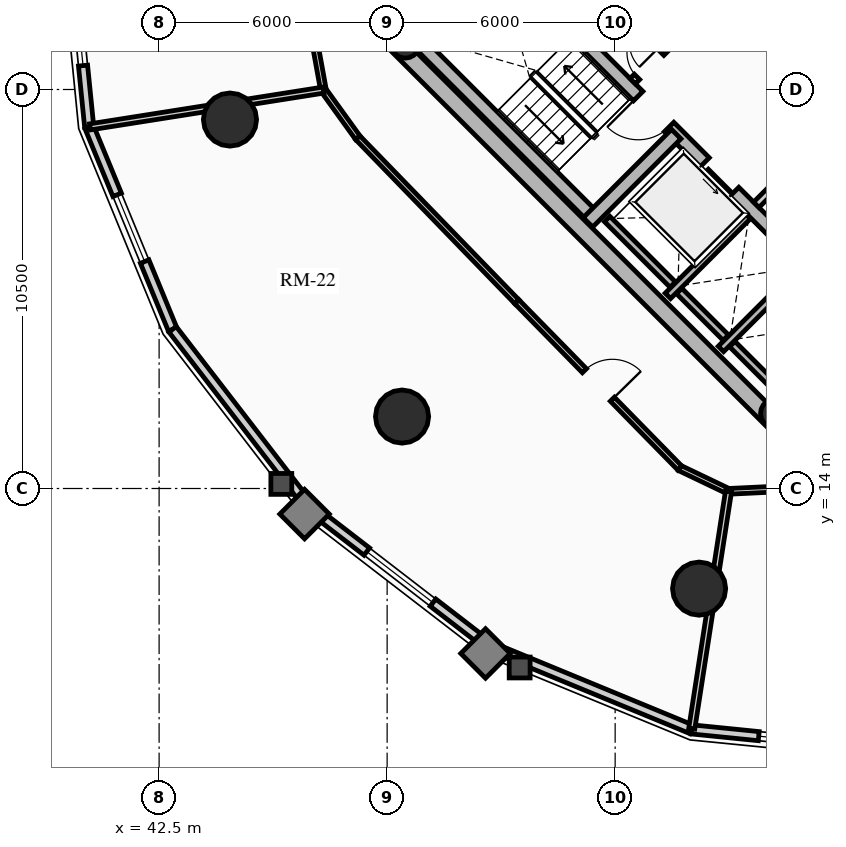
"""IFC4 building model, lengths in metres.
Left out: names, types, materials, properties, quantities, classifications, styles, units other than length and angle.
Written with IfcOpenShell. Run it as: python <this file> out.ifc"""

import sys

from ifc_helpers import new_model, si_unit, direction, frame, frame_2d, origin, origin_2d, place, context, subcontext, project, spatial, rectangle, circle, hollow_circle, extrude, source, transform, mapped, element, fill, save


model = new_model("IFC4")
c1 = context("Model", 3, precision=1e-05, world=origin(), true_north=direction((0.0, 1.0)))
c2 = subcontext(c1, "Body", "Model", "MODEL_VIEW")
j1 = project(units=[si_unit("LENGTHUNIT", "METRE"), si_unit("PLANEANGLEUNIT", "RADIAN")], contexts=[c1])
p1 = place(None, origin())
s1 = spatial("IfcSite", under=j1, at=p1, CompositionType="ELEMENT")
p2 = place(p1, origin())
s2 = spatial("IfcBuilding", under=s1, at=p2, CompositionType="ELEMENT")
p3 = place(p2, frame((0.0, 0.0, 75.97)))
s3 = spatial("IfcBuildingStorey", under=s2, at=p3, CompositionType="ELEMENT", Elevation=75.97)
for number, where, z_axis, x_axis in (
    (1, (58.737, 15.697, 0.0), (0.0, 0.0, 1.0), (-0.707, 0.707, 0.0)),
    (2, (66.303, 23.263, 0.0), (0.0, 0.0, 1.0), (-0.707, 0.707, 0.0)),
):
    element("IfcWall", number, at=place(p3, frame(where, z_axis=z_axis, x_axis=x_axis)), inside=s3, PredefinedType="SHEAR", context=c2, shape_type="SweptSolid", body=[
        extrude(rectangle(XDim=14.2, YDim=0.45, at=frame_2d((7.1, 0.0))), origin(), (0.0, 0.0, 1.0), 2.91),
    ])
p4 = place(p3, frame((58.578, 15.856, 0.0), z_axis=(0.0, 0.0, 1.0), x_axis=(0.707106781187, 0.707106781187, 0.0)))
e3 = element("IfcWall", 3, at=p4, inside=s3, PredefinedType="SHEAR", context=c2, shape_type="SweptSolid", body=[
    extrude(rectangle(XDim=10.7, YDim=0.45, at=frame_2d((5.35, 0.0))), origin(), (0.0, 0.0, 1.0), 2.91),
])
m1 = source(origin(), c2, "Body", "SweptSolid", [
    extrude(rectangle(XDim=1.5, YDim=2.02, at=frame_2d((0.75, 1.01))), frame((0.0, 0.235, 0.0), z_axis=(0.0, -1.0, 0.0), x_axis=(1.0, 0.0, 0.0)), (0.0, 0.0, 1.0), 0.47),
])
p5 = place(p4, frame((5.45, 0.0, 0.0)))
e4 = element("IfcOpeningElement", 4, at=p5, cuts=e3, PredefinedType="OPENING", context=c2, shape_type="MappedRepresentation", body=[
    mapped(m1, transform((0.0, 0.0, 0.0), x_axis=(1.0, 0.0, 0.0), y_axis=(0.0, 1.0, 0.0), z_axis=(0.0, 0.0, 1.0), scale=1.0)),
])
p6 = place(p3, frame((48.856, 25.578, 0.0), z_axis=(0.0, 0.0, 1.0), x_axis=(0.707106781187, 0.707106781187, 0.0)))
e5 = element("IfcWall", 5, at=p6, inside=s3, PredefinedType="SHEAR", context=c2, shape_type="SweptSolid", body=[
    extrude(rectangle(XDim=10.7, YDim=0.45, at=frame_2d((5.35, 0.0))), origin(), (0.0, 0.0, 1.0), 2.91),
])
p7 = place(p6, frame((4.6, 0.0, 0.0)))
e6 = element("IfcOpeningElement", 6, at=p7, cuts=e5, PredefinedType="OPENING", context=c2, shape_type="MappedRepresentation", body=[
    mapped(m1, transform((0.0, 0.0, 0.0), x_axis=(1.0, 0.0, 0.0), y_axis=(0.0, 1.0, 0.0), z_axis=(0.0, 0.0, 1.0), scale=1.0)),
])
p8 = place(p3, frame((61.078, 18.355, 0.0), z_axis=(0.0, 0.0, 1.0), x_axis=(-0.707106781187, 0.707106781187, 0.0)))
e7 = element("IfcWall", 7, at=p8, inside=s3, PredefinedType="SHEAR", context=c2, shape_type="SweptSolid", body=[
    extrude(rectangle(XDim=13.75, YDim=0.35, at=frame_2d((6.875, 0.0))), origin(), (0.0, 0.0, 1.0), 2.91),
])
m2 = source(origin(), c2, "Body", "SweptSolid", [
    extrude(rectangle(XDim=1.1, YDim=2.015, at=frame_2d((0.55, 1.007))), frame((0.0, 0.185, 0.0), z_axis=(0.0, -1.0, 0.0), x_axis=(1.0, 0.0, 0.0)), (0.0, 0.0, 1.0), 0.37),
])
p9 = place(p8, frame((4.875, 0.0, 0.0)))
e8 = element("IfcOpeningElement", 8, at=p9, cuts=e7, PredefinedType="OPENING", context=c2, shape_type="MappedRepresentation", body=[
    mapped(m2, transform((0.0, 0.0, 0.0), x_axis=(1.0, 0.0, 0.0), y_axis=(0.0, 1.0, 0.0), z_axis=(0.0, 0.0, 1.0), scale=1.0)),
])
m3 = source(origin(), c2, "Body", "SweptSolid", [
    extrude(rectangle(XDim=1.15, YDim=2.02, at=frame_2d((0.575, 1.01))), frame((0.0, 0.185, 0.0), z_axis=(0.0, -1.0, 0.0), x_axis=(1.0, 0.0, 0.0)), (0.0, 0.0, 1.0), 0.37),
])
p10 = place(p8, frame((7.295, 0.0, 0.0)))
e9 = element("IfcOpeningElement", 9, at=p10, cuts=e7, PredefinedType="OPENING", context=c2, shape_type="MappedRepresentation", body=[
    mapped(m3, transform((0.0, 0.0, 0.0), x_axis=(1.0, 0.0, 0.0), y_axis=(0.0, 1.0, 0.0), z_axis=(0.0, 0.0, 1.0), scale=1.0)),
])
p11 = place(p3, frame((63.645, 20.922, 0.0), z_axis=(0.0, 0.0, 1.0), x_axis=(-0.707106781187, 0.707106781187, 0.0)))
e10 = element("IfcWall", 10, at=p11, inside=s3, PredefinedType="SHEAR", context=c2, shape_type="SweptSolid", body=[
    extrude(rectangle(XDim=13.75, YDim=0.35, at=frame_2d((6.875, 0.0))), origin(), (0.0, 0.0, 1.0), 2.91),
])
p12 = place(p11, frame((10.0, 0.0, 0.0)))
e11 = element("IfcOpeningElement", 11, at=p12, cuts=e10, PredefinedType="OPENING", context=c2, shape_type="MappedRepresentation", body=[
    mapped(m2, transform((0.0, 0.0, 0.0), x_axis=(1.0, 0.0, 0.0), y_axis=(0.0, 1.0, 0.0), z_axis=(0.0, 0.0, 1.0), scale=1.0)),
])
p13 = place(p11, frame((12.0, 0.0, 0.0)))
e12 = element("IfcOpeningElement", 12, at=p13, cuts=e10, PredefinedType="OPENING", context=c2, shape_type="MappedRepresentation", body=[
    mapped(m2, transform((0.0, 0.0, 0.0), x_axis=(1.0, 0.0, 0.0), y_axis=(0.0, 1.0, 0.0), z_axis=(0.0, 0.0, 1.0), scale=1.0)),
])
p14 = place(p11, frame((5.305, 0.0, 0.0)))
e13 = element("IfcOpeningElement", 13, at=p14, cuts=e10, PredefinedType="OPENING", context=c2, shape_type="MappedRepresentation", body=[
    mapped(m3, transform((0.0, 0.0, 0.0), x_axis=(1.0, 0.0, 0.0), y_axis=(0.0, 1.0, 0.0), z_axis=(0.0, 0.0, 1.0), scale=1.0)),
])
p15 = place(p3, frame((53.922, 21.141, 0.0), z_axis=(0.0, 0.0, 1.0), x_axis=(-0.707088616009, 0.707124945897, 0.0)))
e14 = element("IfcWall", 14, at=p15, inside=s3, PredefinedType="SHEAR", context=c2, shape_type="SweptSolid", body=[
    extrude(rectangle(XDim=6.72, YDim=0.35, at=frame_2d((3.36, 0.0))), origin(), (0.0, 0.0, 1.0), 2.91),
])
p16 = place(p3, frame((53.784, 21.003, 0.0), z_axis=(0.0, 0.0, 1.0), x_axis=(0.707106781187, 0.707106781187, 0.0)))
e15 = element("IfcWall", 15, at=p16, inside=s3, PredefinedType="SHEAR", context=c2, shape_type="SweptSolid", body=[
    extrude(rectangle(XDim=3.285, YDim=0.35, at=frame_2d((1.643, 0.0))), origin(), (0.0, 0.0, 1.0), 2.91),
])
for number, where, z_axis, x_axis in (
    (16, (58.706, 15.976, 0.0), (0.0, 0.0, 1.0), (0.707, 0.707, 0.0)),
    (17, (48.976, 25.706, 0.0), (0.0, 0.0, 1.0), (0.707, 0.707, 0.0)),
):
    element("IfcColumn", number, at=place(p3, frame(where, z_axis=z_axis, x_axis=x_axis)), inside=s3, PredefinedType="COLUMN", context=c2, shape_type="SweptSolid", body=[
        extrude(hollow_circle(Radius=0.38, WallThickness=0.032, at=origin_2d()), origin(), (0.0, 0.0, 1.0), 2.91),
    ])
for number, where, z_axis, x_axis in (
    (18, (44.365, 23.709, 0.0), (0.0, 0.0, 1.0), (1.0, 0.0, 0.0)),
    (19, (48.893, 15.893, 0.0), (0.0, 0.0, 1.0), (1.0, 0.0, 0.0)),
    (20, (56.709, 11.365, 0.0), (0.0, 0.0, 1.0), (1.0, 0.0, 0.0)),
):
    element("IfcColumn", number, at=place(p3, frame(where, z_axis=z_axis, x_axis=x_axis)), inside=s3, PredefinedType="USERDEFINED", context=c2, shape_type="SweptSolid", body=[
        extrude(circle(Radius=0.7, at=origin_2d()), origin(), (0.0, 0.0, 1.0), 2.91),
    ])
p17 = place(p3, frame((40.661, 23.513, 0.0), z_axis=(0.0, 0.0, 1.0), x_axis=(-0.10015591906, 0.994971754311, 0.0)))
e21 = element("IfcWall", 21, at=p17, inside=s3, PredefinedType="SOLIDWALL", context=c2, shape_type="SweptSolid", body=[
    extrude(rectangle(XDim=5.448, YDim=0.24, at=frame_2d((2.724, 0.0))), origin(), (0.0, 0.0, 1.0), 2.179),
])
m4 = source(origin(), c2, "Body", "SweptSolid", [
    extrude(rectangle(XDim=2.2, YDim=1.35, at=frame_2d((1.1, 0.675))), frame((0.0, 0.13, 0.0), z_axis=(0.0, -1.0, 0.0), x_axis=(1.0, 0.0, 0.0)), (0.0, 0.0, 1.0), 0.26),
])
p18 = place(p17, frame((1.624, 0.0, 0.65)))
e22 = element("IfcOpeningElement", 22, at=p18, cuts=e21, PredefinedType="OPENING", context=c2, shape_type="MappedRepresentation", body=[
    mapped(m4, transform((0.0, 0.0, 0.0), x_axis=(1.0, 0.0, 0.0), y_axis=(0.0, 1.0, 0.0), z_axis=(0.0, 0.0, 1.0), scale=1.0)),
])
p19 = place(p3, frame((42.855, 18.189, 0.0), z_axis=(0.0, 0.0, 1.0), x_axis=(-0.381027003055, 0.924563909604, 0.0)))
e23 = element("IfcWall", 23, at=p19, inside=s3, PredefinedType="SOLIDWALL", context=c2, shape_type="SweptSolid", body=[
    extrude(rectangle(XDim=5.758, YDim=0.24, at=frame_2d((2.879, 0.0))), origin(), (0.0, 0.0, 1.0), 2.179),
])
m5 = source(origin(), c2, "Body", "SweptSolid", [
    extrude(rectangle(XDim=1.9, YDim=1.35, at=frame_2d((0.95, 0.675))), frame((0.0, 0.13, 0.0), z_axis=(0.0, -1.0, 0.0), x_axis=(1.0, 0.0, 0.0)), (0.0, 0.0, 1.0), 0.26),
])
p20 = place(p19, frame((1.929, 0.0, 0.65)))
e24 = element("IfcOpeningElement", 24, at=p20, cuts=e23, PredefinedType="OPENING", context=c2, shape_type="MappedRepresentation", body=[
    mapped(m5, transform((0.0, 0.0, 0.0), x_axis=(1.0, 0.0, 0.0), y_axis=(0.0, 1.0, 0.0), z_axis=(0.0, 0.0, 1.0), scale=1.0)),
])
p21 = place(p3, frame((46.483, 13.483, 0.0), z_axis=(0.0, 0.0, 1.0), x_axis=(-0.61054437102, 0.791982052206, 0.0)))
e25 = element("IfcWall", 25, at=p21, inside=s3, PredefinedType="SOLIDWALL", context=c2, shape_type="SweptSolid", body=[
    extrude(rectangle(XDim=5.942, YDim=0.24, at=frame_2d((2.971, 0.0))), origin(), (0.0, 0.0, 1.0), 2.179),
])
p22 = place(p3, frame((51.189, 9.855, 0.0), z_axis=(0.0, 0.0, 1.0), x_axis=(-0.791982052206, 0.61054437102, 0.0)))
e26 = element("IfcWall", 26, at=p22, inside=s3, PredefinedType="SOLIDWALL", context=c2, shape_type="SweptSolid", body=[
    extrude(rectangle(XDim=5.942, YDim=0.24, at=frame_2d((2.971, 0.0))), origin(), (0.0, 0.0, 1.0), 2.179),
])
p23 = place(p22, frame((1.871, 0.0, 0.65)))
e27 = element("IfcOpeningElement", 27, at=p23, cuts=e26, PredefinedType="OPENING", context=c2, shape_type="MappedRepresentation", body=[
    mapped(m4, transform((0.0, 0.0, 0.0), x_axis=(1.0, 0.0, 0.0), y_axis=(0.0, 1.0, 0.0), z_axis=(0.0, 0.0, 1.0), scale=1.0)),
])
p24 = place(p3, frame((56.513, 7.661, 0.0), z_axis=(0.0, 0.0, 1.0), x_axis=(-0.924563909604, 0.381027003055, 0.0)))
e28 = element("IfcWall", 28, at=p24, inside=s3, PredefinedType="SOLIDWALL", context=c2, shape_type="SweptSolid", body=[
    extrude(rectangle(XDim=5.758, YDim=0.24, at=frame_2d((2.879, 0.0))), origin(), (0.0, 0.0, 1.0), 2.179),
])
p25 = place(p3, frame((61.933, 7.115, 0.0), z_axis=(0.0, 0.0, 1.0), x_axis=(-0.994971754311, 0.10015591906, 0.0)))
e29 = element("IfcWall", 29, at=p25, inside=s3, PredefinedType="SOLIDWALL", context=c2, shape_type="SweptSolid", body=[
    extrude(rectangle(XDim=5.448, YDim=0.24, at=frame_2d((2.724, 0.0))), origin(), (0.0, 0.0, 1.0), 2.179),
])
p26 = place(p25, frame((1.774, 0.0, 0.65)))
e30 = element("IfcOpeningElement", 30, at=p26, cuts=e29, PredefinedType="OPENING", context=c2, shape_type="MappedRepresentation", body=[
    mapped(m5, transform((0.0, 0.0, 0.0), x_axis=(1.0, 0.0, 0.0), y_axis=(0.0, 1.0, 0.0), z_axis=(0.0, 0.0, 1.0), scale=1.0)),
])
p27 = place(p3, frame((55.888, 19.069, 0.0), z_axis=(0.0, 0.0, 1.0), x_axis=(0.707106781187, 0.707106781187, 0.0)))
e31 = element("IfcWall", 31, at=p27, inside=s3, PredefinedType="SHEAR", context=c2, shape_type="SweptSolid", body=[
    extrude(rectangle(XDim=2.97, YDim=0.2, at=frame_2d((1.485, 0.0))), origin(), (0.0, 0.0, 1.0), 2.91),
])
p28 = place(p3, frame((56.015, 19.366, 0.0), z_axis=(0.0, 0.0, 1.0), x_axis=(-0.707106781187, 0.707106781187, 0.0)))
e32 = element("IfcWall", 32, at=p28, inside=s3, PredefinedType="SHEAR", context=c2, shape_type="SweptSolid", body=[
    extrude(rectangle(XDim=2.44, YDim=0.2, at=frame_2d((1.22, 0.0))), origin(), (0.0, 0.0, 1.0), 2.91),
])
p29 = place(p3, frame((57.284, 17.673, 0.0), z_axis=(0.0, 0.0, 1.0), x_axis=(0.707147878904, 0.70706568108, 0.0)))
e33 = element("IfcWall", 33, at=p29, inside=s3, PredefinedType="SHEAR", context=c2, shape_type="SweptSolid", body=[
    extrude(rectangle(XDim=2.97, YDim=0.2, at=frame_2d((1.485, 0.0))), origin(), (0.0, 0.0, 1.0), 2.91),
])
p30 = place(p3, frame((57.412, 17.97, 0.0), z_axis=(0.0, 0.0, 1.0), x_axis=(-0.707106781187, 0.707106781187, 0.0)))
e34 = element("IfcWall", 34, at=p30, inside=s3, PredefinedType="SHEAR", context=c2, shape_type="SweptSolid", body=[
    extrude(rectangle(XDim=1.735, YDim=0.2, at=frame_2d((0.867, 0.0))), origin(), (0.0, 0.0, 1.0), 2.91),
])
p31 = place(p3, frame((58.737, 16.644, 0.0), z_axis=(0.0, 0.0, 1.0), x_axis=(-0.707032117043, 0.707181437447, 0.0)))
e35 = element("IfcWall", 35, at=p31, inside=s3, PredefinedType="SHEAR", context=c2, shape_type="SweptSolid", body=[
    extrude(rectangle(XDim=1.635, YDim=0.2, at=frame_2d((0.817, 0.0))), origin(), (0.0, 0.0, 1.0), 2.91),
])
p32 = place(p3, frame((58.214, 21.467, 0.0), z_axis=(0.0, 0.0, 1.0), x_axis=(0.707106781187, 0.707106781187, 0.0)))
e36 = element("IfcWall", 36, at=p32, inside=s3, PredefinedType="PARTITIONING", context=c2, shape_type="SweptSolid", body=[
    extrude(rectangle(XDim=3.28, YDim=0.2, at=frame_2d((1.64, 0.0))), origin(), (0.0, 0.0, 1.0), 2.655),
])
m6 = source(origin(), c2, "Body", "SweptSolid", [
    extrude(rectangle(XDim=1.5, YDim=2.02, at=frame_2d((0.75, 1.01))), frame((0.0, 0.11, 0.0), z_axis=(0.0, -1.0, 0.0), x_axis=(1.0, 0.0, 0.0)), (0.0, 0.0, 1.0), 0.22),
])
p33 = place(p32, frame((1.55, 0.0, 0.0)))
e37 = element("IfcOpeningElement", 37, at=p33, cuts=e36, PredefinedType="OPENING", context=c2, shape_type="MappedRepresentation", body=[
    mapped(m6, transform((0.0, 0.0, 0.0), x_axis=(1.0, 0.0, 0.0), y_axis=(0.0, 1.0, 0.0), z_axis=(0.0, 0.0, 1.0), scale=1.0)),
])
p34 = place(p3, frame((54.961, 24.719, 0.0), z_axis=(0.0, 0.0, 1.0), x_axis=(0.707106781187, 0.707106781187, 0.0)))
e38 = element("IfcWall", 38, at=p34, inside=s3, PredefinedType="PARTITIONING", context=c2, shape_type="SweptSolid", body=[
    extrude(rectangle(XDim=3.28, YDim=0.2, at=frame_2d((1.64, 0.0))), origin(), (0.0, 0.0, 1.0), 2.655),
])
m7 = source(origin(), c2, "Body", "SweptSolid", [
    extrude(rectangle(XDim=0.9, YDim=2.005, at=frame_2d((0.45, 1.002))), frame((0.0, 0.11, 0.0), z_axis=(0.0, -1.0, 0.0), x_axis=(1.0, 0.0, 0.0)), (0.0, 0.0, 1.0), 0.22),
])
p35 = place(p34, frame((0.16, 0.0, 0.0)))
e39 = element("IfcOpeningElement", 39, at=p35, cuts=e38, PredefinedType="OPENING", context=c2, shape_type="MappedRepresentation", body=[
    mapped(m7, transform((0.0, 0.0, 0.0), x_axis=(1.0, 0.0, 0.0), y_axis=(0.0, 1.0, 0.0), z_axis=(0.0, 0.0, 1.0), scale=1.0)),
])
p36 = place(p3, frame((46.576, 25.85, 0.0), z_axis=(0.0, 0.0, 1.0), x_axis=(0.178962865041, -0.983855829345, 0.0)))
e40 = element("IfcWall", 40, at=p36, inside=s3, PredefinedType="PARTITIONING", context=c2, shape_type="SweptSolid", body=[
    extrude(rectangle(XDim=1.387, YDim=0.15, at=frame_2d((0.694, 0.0))), origin(), (0.0, 0.0, 1.0), 2.225),
])
p37 = place(p3, frame((46.824, 24.485, 0.0), z_axis=(0.0, 0.0, 1.0), x_axis=(0.584890953925, -0.811111935565, 0.0)))
e41 = element("IfcWall", 41, at=p37, inside=s3, PredefinedType="PARTITIONING", context=c2, shape_type="SweptSolid", body=[
    extrude(rectangle(XDim=1.547, YDim=0.15, at=frame_2d((0.773, 0.0))), origin(), (0.0, 0.0, 1.0), 2.225),
])
p38 = place(p3, frame((47.729, 23.23, 0.0), z_axis=(0.0, 0.0, 1.0), x_axis=(0.696119834292, -0.717925606386, 0.0)))
e42 = element("IfcWall", 42, at=p38, inside=s3, PredefinedType="PARTITIONING", context=c2, shape_type="SweptSolid", body=[
    extrude(rectangle(XDim=6.012, YDim=0.15, at=frame_2d((3.006, 0.0))), origin(), (0.0, 0.0, 1.0), 2.655),
])
p39 = place(p3, frame((51.914, 18.914, 0.0), z_axis=(0.0, 0.0, 1.0), x_axis=(0.6999614951, -0.71418058317, 0.0)))
e43 = element("IfcWall", 43, at=p39, inside=s3, PredefinedType="PARTITIONING", context=c2, shape_type="SweptSolid", body=[
    extrude(rectangle(XDim=6.13, YDim=0.15, at=frame_2d((3.065, 0.0))), origin(), (0.0, 0.0, 1.0), 2.225),
])
m8 = source(origin(), c2, "Body", "SweptSolid", [
    extrude(rectangle(XDim=1.05, YDim=2.015, at=frame_2d((0.525, 1.007))), frame((0.0, 0.085, 0.0), z_axis=(0.0, -1.0, 0.0), x_axis=(1.0, 0.0, 0.0)), (0.0, 0.0, 1.0), 0.17),
])
p40 = place(p39, frame((2.54, 0.0, 0.0)))
e44 = element("IfcOpeningElement", 44, at=p40, cuts=e43, PredefinedType="OPENING", context=c2, shape_type="MappedRepresentation", body=[
    mapped(m8, transform((0.0, 0.0, 0.0), x_axis=(1.0, 0.0, 0.0), y_axis=(0.0, 1.0, 0.0), z_axis=(0.0, 0.0, 1.0), scale=1.0)),
])
p41 = place(p3, frame((56.204, 14.536, 0.0), z_axis=(0.0, 0.0, 1.0), x_axis=(0.902244982981, -0.431223828986, 0.0)))
e45 = element("IfcWall", 45, at=p41, inside=s3, PredefinedType="PARTITIONING", context=c2, shape_type="SweptSolid", body=[
    extrude(rectangle(XDim=1.417, YDim=0.15, at=frame_2d((0.708, 0.0))), origin(), (0.0, 0.0, 1.0), 2.225),
])
p42 = place(p3, frame((57.483, 13.925, 0.0), z_axis=(0.0, 0.0, 1.0), x_axis=(0.998884345706, 0.047223552414, 0.0)))
e46 = element("IfcWall", 46, at=p42, inside=s3, PredefinedType="PARTITIONING", context=c2, shape_type="SweptSolid", body=[
    extrude(rectangle(XDim=1.494, YDim=0.15, at=frame_2d((0.747, 0.0))), origin(), (0.0, 0.0, 1.0), 2.225),
])
p43 = place(p3, frame((46.824, 24.485, 0.0), z_axis=(0.0, 0.0, 1.0), x_axis=(-0.987794772558, -0.155760994179, 0.0)))
e47 = element("IfcWall", 47, at=p43, inside=s3, PredefinedType="PARTITIONING", context=c2, shape_type="SweptSolid", body=[
    extrude(rectangle(XDim=6.219, YDim=0.16, at=frame_2d((3.11, 0.0))), origin(), (0.0, 0.0, 1.0), 2.179),
])
p44 = place(p3, frame((57.483, 13.925, 0.0), z_axis=(0.0, 0.0, 1.0), x_axis=(-0.153035505395, -0.988220690984, 0.0)))
e48 = element("IfcWall", 48, at=p44, inside=s3, PredefinedType="PARTITIONING", context=c2, shape_type="SweptSolid", body=[
    extrude(rectangle(XDim=6.319, YDim=0.16, at=frame_2d((3.16, 0.0))), origin(), (0.0, 0.0, 1.0), 2.179),
])
m9 = source(origin(), c2, "Body", "SweptSolid", [
    extrude(rectangle(XDim=2.2, YDim=1.35, at=frame_2d((1.1, 0.675))), frame((0.0, 0.03, 0.0), z_axis=(0.0, -1.0, 0.0), x_axis=(1.0, 0.0, 0.0)), (0.0, 0.0, 1.0), 0.06),
])
p45 = place(p18, origin())
e49 = element("IfcWindow", 49, at=p45, inside=s3, PartitioningType="DOUBLE_PANEL_VERTICAL", PredefinedType="WINDOW", context=c2, shape_type="MappedRepresentation", body=[
    mapped(m9, transform((0.0, 0.0, 0.0), x_axis=(1.0, 0.0, 0.0), y_axis=(0.0, 1.0, 0.0), z_axis=(0.0, 0.0, 1.0), scale=1.0)),
])
fill(e22, e49)
m10 = source(origin(), c2, "Body", "SweptSolid", [
    extrude(rectangle(XDim=1.9, YDim=1.35, at=frame_2d((0.95, 0.675))), frame((0.0, 0.03, 0.0), z_axis=(0.0, -1.0, 0.0), x_axis=(1.0, 0.0, 0.0)), (0.0, 0.0, 1.0), 0.06),
])
p46 = place(p20, origin())
e50 = element("IfcWindow", 50, at=p46, inside=s3, PartitioningType="DOUBLE_PANEL_VERTICAL", PredefinedType="WINDOW", context=c2, shape_type="MappedRepresentation", body=[
    mapped(m10, transform((0.0, 0.0, 0.0), x_axis=(1.0, 0.0, 0.0), y_axis=(0.0, 1.0, 0.0), z_axis=(0.0, 0.0, 1.0), scale=1.0)),
])
fill(e24, e50)
p47 = place(p23, origin())
e51 = element("IfcWindow", 51, at=p47, inside=s3, PartitioningType="DOUBLE_PANEL_VERTICAL", PredefinedType="WINDOW", context=c2, shape_type="MappedRepresentation", body=[
    mapped(m9, transform((0.0, 0.0, 0.0), x_axis=(1.0, 0.0, 0.0), y_axis=(0.0, 1.0, 0.0), z_axis=(0.0, 0.0, 1.0), scale=1.0)),
])
fill(e27, e51)
p48 = place(p26, origin())
e52 = element("IfcWindow", 52, at=p48, inside=s3, PartitioningType="DOUBLE_PANEL_VERTICAL", PredefinedType="WINDOW", context=c2, shape_type="MappedRepresentation", body=[
    mapped(m10, transform((0.0, 0.0, 0.0), x_axis=(1.0, 0.0, 0.0), y_axis=(0.0, 1.0, 0.0), z_axis=(0.0, 0.0, 1.0), scale=1.0)),
])
fill(e30, e52)
m11 = source(origin(), c2, "Body", "SweptSolid", [
    extrude(rectangle(XDim=1.1, YDim=2.015, at=frame_2d((0.55, 1.007))), frame((0.0, 0.025, 0.0), z_axis=(0.0, -1.0, 0.0), x_axis=(1.0, 0.0, 0.0)), (0.0, 0.0, 1.0), 0.05),
])
p49 = place(p9, origin())
e53 = element("IfcDoor", 53, at=p49, inside=s3, OperationType="SLIDING_TO_LEFT", PredefinedType="DOOR", context=c2, shape_type="MappedRepresentation", body=[
    mapped(m11, transform((0.0, 0.0, 0.0), x_axis=(1.0, 0.0, 0.0), y_axis=(0.0, 1.0, 0.0), z_axis=(0.0, 0.0, 1.0), scale=1.0)),
])
fill(e8, e53)
m12 = source(origin(), c2, "Body", "SweptSolid", [
    extrude(rectangle(XDim=1.15, YDim=2.02, at=frame_2d((0.575, 1.01))), frame((0.0, 0.025, 0.0), z_axis=(0.0, -1.0, 0.0), x_axis=(1.0, 0.0, 0.0)), (0.0, 0.0, 1.0), 0.05),
])
p50 = place(p10, origin())
e54 = element("IfcDoor", 54, at=p50, inside=s3, OperationType="SINGLE_SWING_RIGHT", PredefinedType="DOOR", context=c2, shape_type="MappedRepresentation", body=[
    mapped(m12, transform((0.0, 0.0, 0.0), x_axis=(1.0, 0.0, 0.0), y_axis=(0.0, 1.0, 0.0), z_axis=(0.0, 0.0, 1.0), scale=1.0)),
])
fill(e9, e54)
m13 = source(origin(), c2, "Body", "SweptSolid", [
    extrude(rectangle(XDim=0.9, YDim=2.005, at=frame_2d((0.45, 1.002))), frame((0.0, 0.025, 0.0), z_axis=(0.0, -1.0, 0.0), x_axis=(1.0, 0.0, 0.0)), (0.0, 0.0, 1.0), 0.05),
])
p51 = place(p35, origin())
e55 = element("IfcDoor", 55, at=p51, inside=s3, OperationType="SINGLE_SWING_RIGHT", PredefinedType="DOOR", context=c2, shape_type="MappedRepresentation", body=[
    mapped(m13, transform((0.0, 0.0, 0.0), x_axis=(1.0, 0.0, 0.0), y_axis=(0.0, 1.0, 0.0), z_axis=(0.0, 0.0, 1.0), scale=1.0)),
])
fill(e39, e55)
m14 = source(origin(), c2, "Body", "SweptSolid", [
    extrude(rectangle(XDim=1.05, YDim=2.015, at=frame_2d((0.525, 1.007))), frame((0.0, 0.025, 0.0), z_axis=(0.0, -1.0, 0.0), x_axis=(1.0, 0.0, 0.0)), (0.0, 0.0, 1.0), 0.05),
])
p52 = place(p40, origin())
e56 = element("IfcDoor", 56, at=p52, inside=s3, OperationType="SINGLE_SWING_RIGHT", PredefinedType="DOOR", context=c2, shape_type="MappedRepresentation", body=[
    mapped(m14, transform((0.0, 0.0, 0.0), x_axis=(1.0, 0.0, 0.0), y_axis=(0.0, 1.0, 0.0), z_axis=(0.0, 0.0, 1.0), scale=1.0)),
])
fill(e44, e56)
save(model, sys.argv[1])
